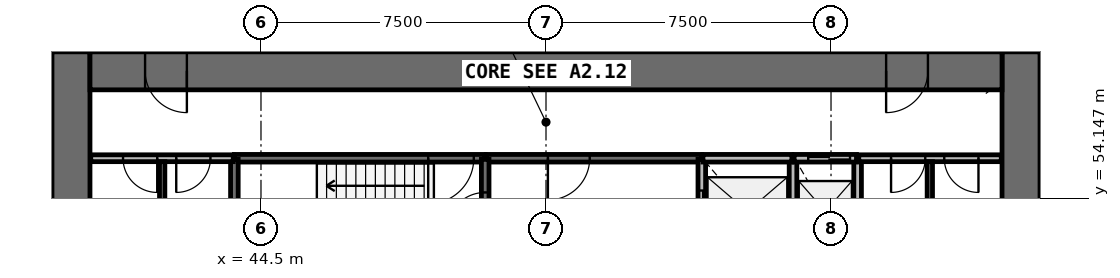
"""IFC4 building model, lengths in metres.
Left out: names, types, materials, properties, quantities, classifications, styles, units other than length and angle.
Written with IfcOpenShell. Run it as: python <this file> out.ifc"""

import sys

from ifc_helpers import new_model, si_unit, direction, frame, frame_2d, origin, place, context, subcontext, project, spatial, rectangle, extrude, source, transform, mapped, element, fill, save


model = new_model("IFC4")
c1 = context("Model", 3, precision=1e-05, world=origin(), true_north=direction((0.0, 1.0)))
c2 = subcontext(c1, "Body", "Model", "MODEL_VIEW")
j1 = project(units=[si_unit("LENGTHUNIT", "METRE"), si_unit("PLANEANGLEUNIT", "RADIAN")], contexts=[c1])
p1 = place(None, origin())
s1 = spatial("IfcSite", under=j1, at=p1, CompositionType="ELEMENT")
p2 = place(p1, origin())
s2 = spatial("IfcBuilding", under=s1, at=p2, CompositionType="ELEMENT")
p3 = place(p2, frame((0.0, 0.0, 49.0)))
s3 = spatial("IfcBuildingStorey", under=s2, at=p3, CompositionType="ELEMENT", Elevation=49.0)
p4 = place(p3, frame((64.5, 38.0, 0.0), z_axis=(0.0, 0.0, 1.0), x_axis=(0.0, 1.0, 0.0)))
e1 = element("IfcWall", 1, at=p4, inside=s3, PredefinedType="SHEAR", context=c2, shape_type="SweptSolid", body=[
    extrude(rectangle(XDim=20.0, YDim=1.0, at=frame_2d((10.0, 0.0))), origin(), (0.0, 0.0, 1.0), 4.4),
])
p5 = place(p4, frame((9.1, 0.0, 0.0)))
e2 = element("IfcOpeningElement", 2, at=p5, cuts=e1, PredefinedType="OPENING", context=c2, shape_type="SweptSolid", body=[
    extrude(rectangle(XDim=1.8, YDim=2.1, at=frame_2d((0.9, 1.05))), frame((0.0, 0.51, 0.0), z_axis=(0.0, -1.0, 0.0), x_axis=(1.0, 0.0, 0.0)), (0.0, 0.0, 1.0), 1.02),
])
p6 = place(p3, frame((39.5, 58.0, 0.0), z_axis=(0.0, 0.0, 1.0), x_axis=(0.0, -1.0, 0.0)))
e3 = element("IfcWall", 3, at=p6, inside=s3, PredefinedType="SHEAR", context=c2, shape_type="SweptSolid", body=[
    extrude(rectangle(XDim=20.0, YDim=1.0, at=frame_2d((10.0, 0.0))), origin(), (0.0, 0.0, 1.0), 4.4),
])
p7 = place(p6, frame((9.1, 0.0, 0.0)))
e4 = element("IfcOpeningElement", 4, at=p7, cuts=e3, PredefinedType="OPENING", context=c2, shape_type="SweptSolid", body=[
    extrude(rectangle(XDim=1.8, YDim=2.1, at=frame_2d((0.9, 1.05))), frame((0.0, 0.51, 0.0), z_axis=(0.0, -1.0, 0.0), x_axis=(1.0, 0.0, 0.0)), (0.0, 0.0, 1.0), 1.02),
])
p8 = place(p3, frame((64.0, 57.5, 0.0), z_axis=(0.0, 0.0, 1.0), x_axis=(-1.0, 0.0, 0.0)))
e5 = element("IfcWall", 5, at=p8, inside=s3, PredefinedType="SHEAR", context=c2, shape_type="SweptSolid", body=[
    extrude(rectangle(XDim=24.0, YDim=1.0, at=frame_2d((12.0, 0.0))), origin(), (0.0, 0.0, 1.0), 4.4),
])
p9 = place(p8, frame((21.45, 0.0, 0.0)))
e6 = element("IfcOpeningElement", 6, at=p9, cuts=e5, PredefinedType="OPENING", context=c2, shape_type="SweptSolid", body=[
    extrude(rectangle(XDim=1.1, YDim=2.1, at=frame_2d((0.55, 1.05))), frame((0.0, 0.51, 0.0), z_axis=(0.0, -1.0, 0.0), x_axis=(1.0, 0.0, 0.0)), (0.0, 0.0, 1.0), 1.02),
])
p10 = place(p8, frame((1.95, 0.0, 0.0)))
e7 = element("IfcOpeningElement", 7, at=p10, cuts=e5, PredefinedType="OPENING", context=c2, shape_type="SweptSolid", body=[
    extrude(rectangle(XDim=1.1, YDim=2.1, at=frame_2d((0.55, 1.05))), frame((0.0, 0.51, 0.0), z_axis=(0.0, -1.0, 0.0), x_axis=(1.0, 0.0, 0.0)), (0.0, 0.0, 1.0), 1.02),
])
p11 = place(p3, frame((50.4, 55.2, 0.0), z_axis=(0.0, 0.0, 1.0), x_axis=(-1.0, 0.0, 0.0)))
e8 = element("IfcWall", 8, at=p11, inside=s3, PredefinedType="SOLIDWALL", context=c2, shape_type="SweptSolid", body=[
    extrude(rectangle(XDim=6.6, YDim=0.2, at=frame_2d((3.3, 0.0))), origin(), (0.0, 0.0, 1.0), 3.95),
])
p12 = place(p11, frame((0.3, 0.0, 0.0)))
e9 = element("IfcOpeningElement", 9, at=p12, cuts=e8, PredefinedType="OPENING", context=c2, shape_type="SweptSolid", body=[
    extrude(rectangle(XDim=1.2, YDim=2.1, at=frame_2d((0.6, 1.05))), frame((0.0, 0.11, 0.0), z_axis=(0.0, -1.0, 0.0), x_axis=(1.0, 0.0, 0.0)), (0.0, 0.0, 1.0), 0.22),
])
p13 = place(p3, frame((56.1, 55.2, 0.0), z_axis=(0.0, 0.0, 1.0), x_axis=(-1.0, 0.0, 0.0)))
e10 = element("IfcWall", 10, at=p13, inside=s3, PredefinedType="SOLIDWALL", context=c2, shape_type="SweptSolid", body=[
    extrude(rectangle(XDim=5.67, YDim=0.2, at=frame_2d((2.835, 0.0))), origin(), (0.0, 0.0, 1.0), 3.95),
])
p14 = place(p13, frame((2.95, 0.0, 0.0)))
e11 = element("IfcOpeningElement", 11, at=p14, cuts=e10, PredefinedType="OPENING", context=c2, shape_type="SweptSolid", body=[
    extrude(rectangle(XDim=1.1, YDim=2.1, at=frame_2d((0.55, 1.05))), frame((0.0, 0.11, 0.0), z_axis=(0.0, -1.0, 0.0), x_axis=(1.0, 0.0, 0.0)), (0.0, 0.0, 1.0), 0.22),
])
p15 = place(p3, frame((50.4, 52.4, 0.0), z_axis=(0.0, 0.0, 1.0), x_axis=(0.0, 1.0, 0.0)))
e12 = element("IfcWall", 12, at=p15, inside=s3, PredefinedType="SOLIDWALL", context=c2, shape_type="SweptSolid", body=[
    extrude(rectangle(XDim=2.77, YDim=0.2, at=frame_2d((1.385, 0.0))), origin(), (0.0, 0.0, 1.0), 3.95),
])
p16 = place(p15, frame((0.9, 0.0, 0.0)))
e13 = element("IfcOpeningElement", 13, at=p16, cuts=e12, PredefinedType="OPENING", context=c2, shape_type="SweptSolid", body=[
    extrude(rectangle(XDim=1.0, YDim=2.1, at=frame_2d((0.5, 1.05))), frame((0.0, 0.11, 0.0), z_axis=(0.0, -1.0, 0.0), x_axis=(1.0, 0.0, 0.0)), (0.0, 0.0, 1.0), 0.22),
])
p17 = place(p3, frame((56.1, 55.17, 0.0), z_axis=(0.0, 0.0, 1.0), x_axis=(0.0, -1.0, 0.0)))
e14 = element("IfcWall", 14, at=p17, inside=s3, PredefinedType="SOLIDWALL", context=c2, shape_type="SweptSolid", body=[
    extrude(rectangle(XDim=2.77, YDim=0.2, at=frame_2d((1.385, 0.0))), origin(), (0.0, 0.0, 1.0), 3.95),
])
p18 = place(p17, frame((0.82, 0.0, 0.0)))
e15 = element("IfcOpeningElement", 15, at=p18, cuts=e14, PredefinedType="OPENING", context=c2, shape_type="SweptSolid", body=[
    extrude(rectangle(XDim=1.1, YDim=2.1, at=frame_2d((0.55, 1.05))), frame((0.0, 0.11, 0.0), z_axis=(0.0, -1.0, 0.0), x_axis=(1.0, 0.0, 0.0)), (0.0, 0.0, 1.0), 0.22),
])
for number, where, z_axis, x_axis in (
    (16, (58.5, 52.4, 0.0), (0.0, 0.0, 1.0), (0.0, 1.0, 0.0)),
    (17, (60.2, 52.4, 0.0), (0.0, 0.0, 1.0), (0.0, 1.0, 0.0)),
):
    element("IfcWall", number, at=place(p3, frame(where, z_axis=z_axis, x_axis=x_axis)), inside=s3, PredefinedType="SOLIDWALL", context=c2, shape_type="SweptSolid", body=[
        extrude(rectangle(XDim=2.8, YDim=0.2, at=frame_2d((1.4, 0.0))), origin(), (0.0, 0.0, 1.0), 3.95),
    ])
p19 = place(p3, frame((58.47, 55.2, 0.0), z_axis=(0.0, 0.0, 1.0), x_axis=(-1.0, 0.0, 0.0)))
e18 = element("IfcWall", 18, at=p19, inside=s3, PredefinedType="SOLIDWALL", context=c2, shape_type="SweptSolid", body=[
    extrude(rectangle(XDim=2.34, YDim=0.2, at=frame_2d((1.17, 0.0))), origin(), (0.0, 0.0, 1.0), 3.95),
])
p20 = place(p3, frame((43.8, 55.17, 0.0), z_axis=(0.0, 0.0, 1.0), x_axis=(0.0, -1.0, 0.0)))
e19 = element("IfcWall", 19, at=p20, inside=s3, PredefinedType="SOLIDWALL", context=c2, shape_type="SweptSolid", body=[
    extrude(rectangle(XDim=2.14, YDim=0.2, at=frame_2d((1.07, 0.0))), origin(), (0.0, 0.0, 1.0), 3.95),
])
p21 = place(p3, frame((60.17, 55.2, 0.0), z_axis=(0.0, 0.0, 1.0), x_axis=(-1.0, 0.0, 0.0)))
e20 = element("IfcWall", 20, at=p21, inside=s3, PredefinedType="SOLIDWALL", context=c2, shape_type="SweptSolid", body=[
    extrude(rectangle(XDim=1.64, YDim=0.2, at=frame_2d((0.82, 0.0))), origin(), (0.0, 0.0, 1.0), 3.95),
])
p22 = place(p21, frame((0.17, 0.0, 0.0)))
e21 = element("IfcOpeningElement", 21, at=p22, cuts=e20, PredefinedType="OPENING", context=c2, shape_type="SweptSolid", body=[
    extrude(rectangle(XDim=1.1, YDim=2.1, at=frame_2d((0.55, 1.05))), frame((0.0, 0.11, 0.0), z_axis=(0.0, -1.0, 0.0), x_axis=(1.0, 0.0, 0.0)), (0.0, 0.0, 1.0), 0.22),
])
p23 = place(p3, frame((43.77, 55.2, 0.0), z_axis=(0.0, 0.0, 1.0), x_axis=(-1.0, 0.0, 0.0)))
e22 = element("IfcWall", 22, at=p23, inside=s3, PredefinedType="PARTITIONING", context=c2, shape_type="SweptSolid", body=[
    extrude(rectangle(XDim=3.75, YDim=0.18, at=frame_2d((1.875, 0.0))), origin(), (0.0, 0.0, 1.0), 3.95),
])
p24 = place(p23, frame((2.0, 0.0, 0.0)))
e23 = element("IfcOpeningElement", 23, at=p24, cuts=e22, PredefinedType="OPENING", context=c2, shape_type="SweptSolid", body=[
    extrude(rectangle(XDim=0.9, YDim=2.1, at=frame_2d((0.45, 1.05))), frame((0.0, 0.1, 0.0), z_axis=(0.0, -1.0, 0.0), x_axis=(1.0, 0.0, 0.0)), (0.0, 0.0, 1.0), 0.2),
])
p25 = place(p23, frame((0.6, 0.0, 0.0)))
e24 = element("IfcOpeningElement", 24, at=p25, cuts=e22, PredefinedType="OPENING", context=c2, shape_type="SweptSolid", body=[
    extrude(rectangle(XDim=0.9, YDim=2.1, at=frame_2d((0.45, 1.05))), frame((0.0, 0.1, 0.0), z_axis=(0.0, -1.0, 0.0), x_axis=(1.0, 0.0, 0.0)), (0.0, 0.0, 1.0), 0.2),
])
p26 = place(p3, frame((63.98, 55.2, 0.0), z_axis=(0.0, 0.0, 1.0), x_axis=(-1.0, 0.0, 0.0)))
e25 = element("IfcWall", 25, at=p26, inside=s3, PredefinedType="PARTITIONING", context=c2, shape_type="SweptSolid", body=[
    extrude(rectangle(XDim=3.75, YDim=0.18, at=frame_2d((1.875, 0.0))), origin(), (0.0, 0.0, 1.0), 3.95),
])
p27 = place(p26, frame((2.0, 0.0, 0.0)))
e26 = element("IfcOpeningElement", 26, at=p27, cuts=e25, PredefinedType="OPENING", context=c2, shape_type="SweptSolid", body=[
    extrude(rectangle(XDim=0.9, YDim=2.1, at=frame_2d((0.45, 1.05))), frame((0.0, 0.1, 0.0), z_axis=(0.0, -1.0, 0.0), x_axis=(1.0, 0.0, 0.0)), (0.0, 0.0, 1.0), 0.2),
])
p28 = place(p26, frame((0.6, 0.0, 0.0)))
e27 = element("IfcOpeningElement", 27, at=p28, cuts=e25, PredefinedType="OPENING", context=c2, shape_type="SweptSolid", body=[
    extrude(rectangle(XDim=0.9, YDim=2.1, at=frame_2d((0.45, 1.05))), frame((0.0, 0.1, 0.0), z_axis=(0.0, -1.0, 0.0), x_axis=(1.0, 0.0, 0.0)), (0.0, 0.0, 1.0), 0.2),
])
p29 = place(p3, frame((62.1, 52.4, 0.0), z_axis=(0.0, 0.0, 1.0), x_axis=(0.0, 1.0, 0.0)))
e28 = element("IfcWall", 28, at=p29, inside=s3, PredefinedType="PARTITIONING", context=c2, shape_type="SweptSolid", body=[
    extrude(rectangle(XDim=2.71, YDim=0.14, at=frame_2d((1.355, 0.0))), origin(), (0.0, 0.0, 1.0), 3.05),
])
p30 = place(p3, frame((41.9, 53.1, 0.0), z_axis=(0.0, 0.0, 1.0), x_axis=(0.0, 1.0, 0.0)))
e29 = element("IfcWall", 29, at=p30, inside=s3, PredefinedType="PARTITIONING", context=c2, shape_type="SweptSolid", body=[
    extrude(rectangle(XDim=2.01, YDim=0.14, at=frame_2d((1.005, 0.0))), origin(), (0.0, 0.0, 1.0), 3.05),
])
m1 = source(origin(), c2, "Body", "SweptSolid", [
    extrude(rectangle(XDim=1.1, YDim=2.1, at=frame_2d((0.55, 1.05))), frame((0.0, 0.025, 0.0), z_axis=(0.0, -1.0, 0.0), x_axis=(1.0, 0.0, 0.0)), (0.0, 0.0, 1.0), 0.05),
])
p31 = place(p18, origin())
e30 = element("IfcDoor", 30, at=p31, inside=s3, OperationType="DOUBLE_DOOR_SLIDING", PredefinedType="USERDEFINED", context=c2, shape_type="MappedRepresentation", body=[
    mapped(m1, transform((0.0, 0.0, 0.0), scale=1.0)),
])
fill(e15, e30)
p32 = place(p22, origin())
e31 = element("IfcDoor", 31, at=p32, inside=s3, OperationType="DOUBLE_DOOR_SLIDING", PredefinedType="USERDEFINED", context=c2, shape_type="MappedRepresentation", body=[
    mapped(m1, transform((0.0, 0.0, 0.0), scale=1.0)),
])
fill(e21, e31)
m2 = source(origin(), c2, "Body", "SweptSolid", [
    extrude(rectangle(XDim=1.2, YDim=2.1, at=frame_2d((0.6, 1.05))), frame((0.0, 0.025, 0.0), z_axis=(0.0, -1.0, 0.0), x_axis=(1.0, 0.0, 0.0)), (0.0, 0.0, 1.0), 0.05),
])
p33 = place(p12, origin())
e32 = element("IfcDoor", 32, at=p33, inside=s3, OperationType="SINGLE_SWING_RIGHT", PredefinedType="DOOR", context=c2, shape_type="MappedRepresentation", body=[
    mapped(m2, transform((0.0, 0.0, 0.0), scale=1.0)),
])
fill(e9, e32)
m3 = source(origin(), c2, "Body", "SweptSolid", [
    extrude(rectangle(XDim=1.0, YDim=2.1, at=frame_2d((0.5, 1.05))), frame((0.0, 0.025, 0.0), z_axis=(0.0, -1.0, 0.0), x_axis=(1.0, 0.0, 0.0)), (0.0, 0.0, 1.0), 0.05),
])
p34 = place(p16, origin())
e33 = element("IfcDoor", 33, at=p34, inside=s3, OperationType="SINGLE_SWING_LEFT", PredefinedType="DOOR", context=c2, shape_type="MappedRepresentation", body=[
    mapped(m3, transform((0.0, 0.0, 0.0), scale=1.0)),
])
fill(e13, e33)
m4 = source(origin(), c2, "Body", "SweptSolid", [
    extrude(rectangle(XDim=1.1, YDim=2.1, at=frame_2d((0.55, 1.05))), frame((0.0, 0.025, 0.0), z_axis=(0.0, -1.0, 0.0), x_axis=(1.0, 0.0, 0.0)), (0.0, 0.0, 1.0), 0.05),
])
p35 = place(p14, origin())
e34 = element("IfcDoor", 34, at=p35, inside=s3, OperationType="SINGLE_SWING_RIGHT", PredefinedType="DOOR", context=c2, shape_type="MappedRepresentation", body=[
    mapped(m4, transform((0.0, 0.0, 0.0), scale=1.0)),
])
fill(e11, e34)
m5 = source(origin(), c2, "Body", "SweptSolid", [
    extrude(rectangle(XDim=1.1, YDim=2.1, at=frame_2d((0.55, 1.05))), frame((0.0, 0.025, 0.0), z_axis=(0.0, -1.0, 0.0), x_axis=(1.0, 0.0, 0.0)), (0.0, 0.0, 1.0), 0.05),
])
p36 = place(p9, origin())
e35 = element("IfcDoor", 35, at=p36, inside=s3, OperationType="SINGLE_SWING_LEFT", PredefinedType="DOOR", context=c2, shape_type="MappedRepresentation", body=[
    mapped(m5, transform((0.0, 0.0, 0.0), scale=1.0)),
])
fill(e6, e35)
p37 = place(p10, origin())
e36 = element("IfcDoor", 36, at=p37, inside=s3, OperationType="SINGLE_SWING_RIGHT", PredefinedType="DOOR", context=c2, shape_type="MappedRepresentation", body=[
    mapped(m5, transform((0.0, 0.0, 0.0), scale=1.0)),
])
fill(e7, e36)
m6 = source(origin(), c2, "Body", "SweptSolid", [
    extrude(rectangle(XDim=0.9, YDim=2.1, at=frame_2d((0.45, 1.05))), frame((0.0, 0.025, 0.0), z_axis=(0.0, -1.0, 0.0), x_axis=(1.0, 0.0, 0.0)), (0.0, 0.0, 1.0), 0.05),
])
p38 = place(p24, origin())
e37 = element("IfcDoor", 37, at=p38, inside=s3, OperationType="SINGLE_SWING_LEFT", PredefinedType="DOOR", context=c2, shape_type="MappedRepresentation", body=[
    mapped(m6, transform((0.0, 0.0, 0.0), scale=1.0)),
])
fill(e23, e37)
p39 = place(p25, origin())
e38 = element("IfcDoor", 38, at=p39, inside=s3, OperationType="SINGLE_SWING_RIGHT", PredefinedType="DOOR", context=c2, shape_type="MappedRepresentation", body=[
    mapped(m6, transform((0.0, 0.0, 0.0), scale=1.0)),
])
fill(e24, e38)
p40 = place(p27, origin())
e39 = element("IfcDoor", 39, at=p40, inside=s3, OperationType="SINGLE_SWING_RIGHT", PredefinedType="DOOR", context=c2, shape_type="MappedRepresentation", body=[
    mapped(m6, transform((0.0, 0.0, 0.0), scale=1.0)),
])
fill(e26, e39)
p41 = place(p28, origin())
e40 = element("IfcDoor", 40, at=p41, inside=s3, OperationType="SINGLE_SWING_LEFT", PredefinedType="DOOR", context=c2, shape_type="MappedRepresentation", body=[
    mapped(m6, transform((0.0, 0.0, 0.0), scale=1.0)),
])
fill(e27, e40)
save(model, sys.argv[1])
